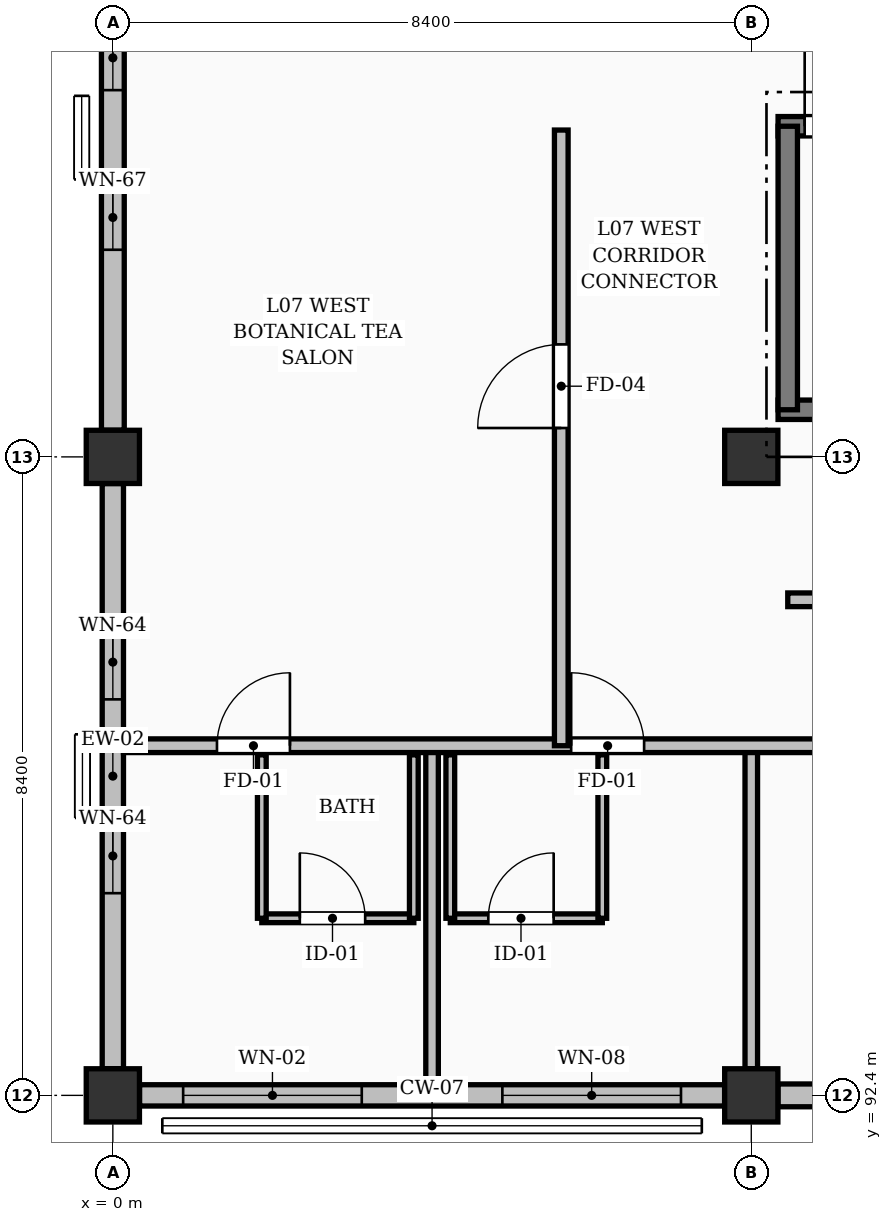
"""IFC4 building model, lengths in metres.
Left out: names, types, materials, properties, quantities, classifications, styles, units other than length and angle.
Written with IfcOpenShell. Run it as: python <this file> out.ifc"""

import sys

from ifc_helpers import new_model, si_unit, direction, frame, frame_2d, origin, origin_2d, place, context, subcontext, project, spatial, rectangle, extrude, element, fill, save


model = new_model("IFC4")
c1 = context("Model", 3, precision=1e-05, world=origin(), true_north=direction((0.0, 1.0)))
c2 = subcontext(c1, "Body", "Model", "MODEL_VIEW")
j1 = project(units=[si_unit("LENGTHUNIT", "METRE"), si_unit("PLANEANGLEUNIT", "RADIAN")], contexts=[c1])
p1 = place(None, origin())
s1 = spatial("IfcSite", under=j1, at=p1, CompositionType="ELEMENT")
p2 = place(p1, origin())
s2 = spatial("IfcBuilding", under=s1, at=p2, CompositionType="ELEMENT")
p3 = place(p2, frame((0.0, 0.0, 25.2)))
s3 = spatial("IfcBuildingStorey", under=s2, at=p3, CompositionType="ELEMENT", Elevation=25.2)
for number, where, z_axis, x_axis in (
    (1, (0.0, 92.4, 0.0), (0.0, 0.0, 1.0), (1.0, 0.0, 0.0)),
    (2, (0.0, 100.8, 0.0), (0.0, 0.0, 1.0), (1.0, 0.0, 0.0)),
    (3, (8.4, 92.4, 0.0), (0.0, 0.0, 1.0), (1.0, 0.0, 0.0)),
    (4, (8.4, 100.8, 0.0), (0.0, 0.0, 1.0), (1.0, 0.0, 0.0)),
):
    element("IfcColumn", number, at=place(p3, frame(where, z_axis=z_axis, x_axis=x_axis)), inside=s3, PredefinedType="COLUMN", context=c2, shape_type="SweptSolid", body=[
        extrude(rectangle(XDim=0.7, YDim=0.7, at=origin_2d()), origin(), (0.0, 0.0, 1.0), 3.36),
    ])
p4 = place(p3, frame((0.351, 92.4, 0.0), z_axis=(0.0, 0.0, 1.0), x_axis=(1.0, 0.0, 0.0)))
e5 = element("IfcWall", 5, at=p4, inside=s3, PredefinedType="SOLIDWALL", context=c2, shape_type="SweptSolid", body=[
    extrude(rectangle(XDim=7.698, YDim=0.28, at=frame_2d((3.849, 0.0))), origin(), (0.0, 0.0, 1.0), 2.414),
])
p5 = place(p4, frame((0.574, 0.0, 0.25)))
e6 = element("IfcOpeningElement", 6, at=p5, cuts=e5, PredefinedType="OPENING", context=c2, shape_type="SweptSolid", body=[
    extrude(rectangle(XDim=2.35, YDim=1.85, at=frame_2d((1.175, 0.925))), frame((0.0, 0.15, 0.0), z_axis=(0.0, -1.0, 0.0), x_axis=(1.0, 0.0, 0.0)), (0.0, 0.0, 1.0), 0.3),
])
p6 = place(p4, frame((4.774, 0.0, 0.25)))
e7 = element("IfcOpeningElement", 7, at=p6, cuts=e5, PredefinedType="OPENING", context=c2, shape_type="SweptSolid", body=[
    extrude(rectangle(XDim=2.35, YDim=1.95, at=frame_2d((1.175, 0.975))), frame((0.0, 0.15, 0.0), z_axis=(0.0, -1.0, 0.0), x_axis=(1.0, 0.0, 0.0)), (0.0, 0.0, 1.0), 0.3),
])
p7 = place(p3, frame((8.751, 92.4, 0.0), z_axis=(0.0, 0.0, 1.0), x_axis=(1.0, 0.0, 0.0)))
e8 = element("IfcWall", 8, at=p7, inside=s3, PredefinedType="SOLIDWALL", context=c2, shape_type="SweptSolid", body=[
    extrude(rectangle(XDim=7.698, YDim=0.3, at=frame_2d((3.849, 0.0))), origin(), (0.0, 0.0, 1.0), 2.494),
])
p8 = place(p7, frame((1.024, 0.0, 0.0)))
e9 = element("IfcOpeningElement", 9, at=p8, cuts=e8, PredefinedType="OPENING", context=c2, shape_type="SweptSolid", body=[
    extrude(rectangle(XDim=1.55, YDim=2.08, at=frame_2d((0.775, 1.04))), frame((0.0, 0.16, 0.0), z_axis=(0.0, -1.0, 0.0), x_axis=(1.0, 0.0, 0.0)), (0.0, 0.0, 1.0), 0.32),
])
p9 = place(p7, frame((4.674, 0.0, 0.25)))
e10 = element("IfcOpeningElement", 10, at=p9, cuts=e8, PredefinedType="OPENING", context=c2, shape_type="SweptSolid", body=[
    extrude(rectangle(XDim=2.25, YDim=1.85, at=frame_2d((1.125, 0.925))), frame((0.0, 0.16, 0.0), z_axis=(0.0, -1.0, 0.0), x_axis=(1.0, 0.0, 0.0)), (0.0, 0.0, 1.0), 0.32),
])
p10 = place(p3, frame((0.0, 92.751, 0.0), z_axis=(0.0, 0.0, 1.0), x_axis=(0.0, 1.0, 0.0)))
e11 = element("IfcWall", 11, at=p10, inside=s3, PredefinedType="SOLIDWALL", context=c2, shape_type="SweptSolid", body=[
    extrude(rectangle(XDim=7.698, YDim=0.28, at=frame_2d((3.849, 0.0))), origin(), (0.0, 0.0, 1.0), 2.414),
])
p11 = place(p10, frame((2.309, 0.0, 0.3)))
e12 = element("IfcOpeningElement", 12, at=p11, cuts=e11, PredefinedType="OPENING", context=c2, shape_type="SweptSolid", body=[
    extrude(rectangle(XDim=0.98, YDim=1.75, at=frame_2d((0.49, 0.875))), frame((0.0, 0.15, 0.0), z_axis=(0.0, -1.0, 0.0), x_axis=(1.0, 0.0, 0.0)), (0.0, 0.0, 1.0), 0.3),
])
p12 = place(p10, frame((4.859, 0.0, 0.3)))
e13 = element("IfcOpeningElement", 13, at=p12, cuts=e11, PredefinedType="OPENING", context=c2, shape_type="SweptSolid", body=[
    extrude(rectangle(XDim=0.98, YDim=1.75, at=frame_2d((0.49, 0.875))), frame((0.0, 0.15, 0.0), z_axis=(0.0, -1.0, 0.0), x_axis=(1.0, 0.0, 0.0)), (0.0, 0.0, 1.0), 0.3),
])
p13 = place(p3, frame((0.0, 101.151, 0.0), z_axis=(0.0, 0.0, 1.0), x_axis=(0.0, 1.0, 0.0)))
e14 = element("IfcWall", 14, at=p13, inside=s3, PredefinedType="SOLIDWALL", context=c2, shape_type="SweptSolid", body=[
    extrude(rectangle(XDim=7.698, YDim=0.3, at=frame_2d((3.849, 0.0))), origin(), (0.0, 0.0, 1.0), 2.414),
])
p14 = place(p13, frame((2.374, 0.0, 0.3)))
e15 = element("IfcOpeningElement", 15, at=p14, cuts=e14, PredefinedType="OPENING", context=c2, shape_type="SweptSolid", body=[
    extrude(rectangle(XDim=0.85, YDim=1.9, at=frame_2d((0.425, 0.95))), frame((0.0, 0.16, 0.0), z_axis=(0.0, -1.0, 0.0), x_axis=(1.0, 0.0, 0.0)), (0.0, 0.0, 1.0), 0.32),
])
p15 = place(p13, frame((4.474, 0.0, 0.3)))
e16 = element("IfcOpeningElement", 16, at=p15, cuts=e14, PredefinedType="OPENING", context=c2, shape_type="SweptSolid", body=[
    extrude(rectangle(XDim=0.85, YDim=1.9, at=frame_2d((0.425, 0.95))), frame((0.0, 0.16, 0.0), z_axis=(0.0, -1.0, 0.0), x_axis=(1.0, 0.0, 0.0)), (0.0, 0.0, 1.0), 0.32),
])
p16 = place(p3, frame((8.752, 101.42, 0.0), z_axis=(0.0, 0.0, 1.0), x_axis=(1.0, 0.0, 0.0)))
e17 = element("IfcWall", 17, at=p16, inside=s3, PredefinedType="SOLIDWALL", context=c2, shape_type="SweptSolid", body=[
    extrude(rectangle(XDim=8.225, YDim=0.255, at=frame_2d((4.113, 0.0))), origin(), (0.0, 0.0, 1.0), 3.12),
])
p17 = place(p3, frame((8.752, 105.15, 0.0), z_axis=(0.0, 0.0, 1.0), x_axis=(1.0, 0.0, 0.0)))
e18 = element("IfcWall", 18, at=p17, inside=s3, PredefinedType="SOLIDWALL", context=c2, shape_type="SweptSolid", body=[
    extrude(rectangle(XDim=8.225, YDim=0.255, at=frame_2d((4.113, 0.0))), origin(), (0.0, 0.0, 1.0), 3.12),
])
p18 = place(p17, frame((0.35, 0.0, 0.0)))
e19 = element("IfcOpeningElement", 19, at=p18, cuts=e18, PredefinedType="OPENING", context=c2, shape_type="SweptSolid", body=[
    extrude(rectangle(XDim=1.16, YDim=2.15, at=frame_2d((0.58, 1.075))), frame((0.0, 0.137, 0.0), z_axis=(0.0, -1.0, 0.0), x_axis=(1.0, 0.0, 0.0)), (0.0, 0.0, 1.0), 0.275),
])
p19 = place(p3, frame((8.88, 101.42, 0.0), z_axis=(0.0, 0.0, 1.0), x_axis=(0.0, 1.0, 0.0)))
e20 = element("IfcWall", 20, at=p19, inside=s3, PredefinedType="SOLIDWALL", context=c2, shape_type="SweptSolid", body=[
    extrude(rectangle(XDim=3.73, YDim=0.255, at=frame_2d((1.865, 0.0))), origin(), (0.0, 0.0, 1.0), 3.12),
])
p20 = place(p3, frame((1.96, 94.73, 0.0), z_axis=(0.0, 0.0, 1.0), x_axis=(1.0, 0.0, 0.0)))
e21 = element("IfcWall", 21, at=p20, inside=s3, PredefinedType="PARTITIONING", context=c2, shape_type="SweptSolid", body=[
    extrude(rectangle(XDim=2.0, YDim=0.115, at=frame_2d((1.0, 0.0))), origin(), (0.0, 0.0, 1.0), 3.12),
])
p21 = place(p20, frame((0.5, 0.0, 0.0)))
e22 = element("IfcOpeningElement", 22, at=p21, cuts=e21, PredefinedType="OPENING", context=c2, shape_type="SweptSolid", body=[
    extrude(rectangle(XDim=0.86, YDim=2.05, at=frame_2d((0.43, 1.025))), frame((0.0, 0.067, 0.0), z_axis=(0.0, -1.0, 0.0), x_axis=(1.0, 0.0, 0.0)), (0.0, 0.0, 1.0), 0.135),
])
for number, where, z_axis, x_axis in (
    (23, (1.96, 94.73, 0.0), (0.0, 0.0, 1.0), (0.0, 1.0, 0.0)),
    (24, (3.96, 94.73, 0.0), (0.0, 0.0, 1.0), (0.0, 1.0, 0.0)),
):
    element("IfcWall", number, at=place(p3, frame(where, z_axis=z_axis, x_axis=x_axis)), inside=s3, PredefinedType="PARTITIONING", context=c2, shape_type="SweptSolid", body=[
        extrude(rectangle(XDim=2.15, YDim=0.115, at=frame_2d((1.075, 0.0))), origin(), (0.0, 0.0, 1.0), 3.12),
    ])
p22 = place(p3, frame((4.44, 94.73, 0.0), z_axis=(0.0, 0.0, 1.0), x_axis=(1.0, 0.0, 0.0)))
e25 = element("IfcWall", 25, at=p22, inside=s3, PredefinedType="PARTITIONING", context=c2, shape_type="SweptSolid", body=[
    extrude(rectangle(XDim=2.0, YDim=0.115, at=frame_2d((1.0, 0.0))), origin(), (0.0, 0.0, 1.0), 3.12),
])
p23 = place(p22, frame((0.5, 0.0, 0.0)))
e26 = element("IfcOpeningElement", 26, at=p23, cuts=e25, PredefinedType="OPENING", context=c2, shape_type="SweptSolid", body=[
    extrude(rectangle(XDim=0.86, YDim=2.05, at=frame_2d((0.43, 1.025))), frame((0.0, 0.067, 0.0), z_axis=(0.0, -1.0, 0.0), x_axis=(1.0, 0.0, 0.0)), (0.0, 0.0, 1.0), 0.135),
])
for number, where, z_axis, x_axis in (
    (27, (4.44, 94.73, 0.0), (0.0, 0.0, 1.0), (0.0, 1.0, 0.0)),
    (28, (6.44, 94.73, 0.0), (0.0, 0.0, 1.0), (0.0, 1.0, 0.0)),
):
    element("IfcWall", number, at=place(p3, frame(where, z_axis=z_axis, x_axis=x_axis)), inside=s3, PredefinedType="PARTITIONING", context=c2, shape_type="SweptSolid", body=[
        extrude(rectangle(XDim=2.15, YDim=0.115, at=frame_2d((1.075, 0.0))), origin(), (0.0, 0.0, 1.0), 3.12),
    ])
p24 = place(p3, frame((4.2, 92.54, 0.0), z_axis=(0.0, 0.0, 1.0), x_axis=(0.0, 1.0, 0.0)))
e29 = element("IfcWall", 29, at=p24, inside=s3, PredefinedType="PARTITIONING", context=c2, shape_type="SweptSolid", body=[
    extrude(rectangle(XDim=4.46, YDim=0.165, at=frame_2d((2.23, 0.0))), origin(), (0.0, 0.0, 1.0), 3.12),
])
p25 = place(p3, frame((8.4, 92.75, 0.0), z_axis=(0.0, 0.0, 1.0), x_axis=(0.0, 1.0, 0.0)))
e30 = element("IfcWall", 30, at=p25, inside=s3, PredefinedType="PARTITIONING", context=c2, shape_type="SweptSolid", body=[
    extrude(rectangle(XDim=4.25, YDim=0.165, at=frame_2d((2.125, 0.0))), origin(), (0.0, 0.0, 1.0), 2.375),
])
p26 = place(p3, frame((0.14, 97.0, 0.0), z_axis=(0.0, 0.0, 1.0), x_axis=(1.0, 0.0, 0.0)))
e31 = element("IfcWall", 31, at=p26, inside=s3, PredefinedType="PARTITIONING", context=c2, shape_type="SweptSolid", body=[
    extrude(rectangle(XDim=50.26, YDim=0.18, at=frame_2d((25.13, 0.0))), origin(), (0.0, 0.0, 1.0), 3.12),
])
p27 = place(p26, frame((1.23, 0.0, 0.0)))
e32 = element("IfcOpeningElement", 32, at=p27, cuts=e31, PredefinedType="OPENING", context=c2, shape_type="SweptSolid", body=[
    extrude(rectangle(XDim=0.96, YDim=2.15, at=frame_2d((0.48, 1.075))), frame((0.0, 0.1, 0.0), z_axis=(0.0, -1.0, 0.0), x_axis=(1.0, 0.0, 0.0)), (0.0, 0.0, 1.0), 0.2),
])
p28 = place(p26, frame((5.89, 0.0, 0.0)))
e33 = element("IfcOpeningElement", 33, at=p28, cuts=e31, PredefinedType="OPENING", context=c2, shape_type="SweptSolid", body=[
    extrude(rectangle(XDim=0.96, YDim=2.15, at=frame_2d((0.48, 1.075))), frame((0.0, 0.1, 0.0), z_axis=(0.0, -1.0, 0.0), x_axis=(1.0, 0.0, 0.0)), (0.0, 0.0, 1.0), 0.2),
])
p29 = place(p26, frame((11.66, 0.0, 0.0)))
e34 = element("IfcOpeningElement", 34, at=p29, cuts=e31, PredefinedType="OPENING", context=c2, shape_type="SweptSolid", body=[
    extrude(rectangle(XDim=1.62, YDim=2.2, at=frame_2d((0.81, 1.1))), frame((0.0, 0.1, 0.0), z_axis=(0.0, -1.0, 0.0), x_axis=(1.0, 0.0, 0.0)), (0.0, 0.0, 1.0), 0.2),
])
p30 = place(p26, frame((18.03, 0.0, 0.0)))
e35 = element("IfcOpeningElement", 35, at=p30, cuts=e31, PredefinedType="OPENING", context=c2, shape_type="SweptSolid", body=[
    extrude(rectangle(XDim=0.96, YDim=2.15, at=frame_2d((0.48, 1.075))), frame((0.0, 0.1, 0.0), z_axis=(0.0, -1.0, 0.0), x_axis=(1.0, 0.0, 0.0)), (0.0, 0.0, 1.0), 0.2),
])
p31 = place(p26, frame((22.69, 0.0, 0.0)))
e36 = element("IfcOpeningElement", 36, at=p31, cuts=e31, PredefinedType="OPENING", context=c2, shape_type="SweptSolid", body=[
    extrude(rectangle(XDim=0.96, YDim=2.15, at=frame_2d((0.48, 1.075))), frame((0.0, 0.1, 0.0), z_axis=(0.0, -1.0, 0.0), x_axis=(1.0, 0.0, 0.0)), (0.0, 0.0, 1.0), 0.2),
])
p32 = place(p26, frame((26.43, 0.0, 0.0)))
e37 = element("IfcOpeningElement", 37, at=p32, cuts=e31, PredefinedType="OPENING", context=c2, shape_type="SweptSolid", body=[
    extrude(rectangle(XDim=0.96, YDim=2.15, at=frame_2d((0.48, 1.075))), frame((0.0, 0.1, 0.0), z_axis=(0.0, -1.0, 0.0), x_axis=(1.0, 0.0, 0.0)), (0.0, 0.0, 1.0), 0.2),
])
p33 = place(p26, frame((31.09, 0.0, 0.0)))
e38 = element("IfcOpeningElement", 38, at=p33, cuts=e31, PredefinedType="OPENING", context=c2, shape_type="SweptSolid", body=[
    extrude(rectangle(XDim=0.96, YDim=2.15, at=frame_2d((0.48, 1.075))), frame((0.0, 0.1, 0.0), z_axis=(0.0, -1.0, 0.0), x_axis=(1.0, 0.0, 0.0)), (0.0, 0.0, 1.0), 0.2),
])
p34 = place(p26, frame((34.83, 0.0, 0.0)))
e39 = element("IfcOpeningElement", 39, at=p34, cuts=e31, PredefinedType="OPENING", context=c2, shape_type="SweptSolid", body=[
    extrude(rectangle(XDim=0.96, YDim=2.15, at=frame_2d((0.48, 1.075))), frame((0.0, 0.1, 0.0), z_axis=(0.0, -1.0, 0.0), x_axis=(1.0, 0.0, 0.0)), (0.0, 0.0, 1.0), 0.2),
])
p35 = place(p26, frame((39.49, 0.0, 0.0)))
e40 = element("IfcOpeningElement", 40, at=p35, cuts=e31, PredefinedType="OPENING", context=c2, shape_type="SweptSolid", body=[
    extrude(rectangle(XDim=0.96, YDim=2.15, at=frame_2d((0.48, 1.075))), frame((0.0, 0.1, 0.0), z_axis=(0.0, -1.0, 0.0), x_axis=(1.0, 0.0, 0.0)), (0.0, 0.0, 1.0), 0.2),
])
p36 = place(p26, frame((43.23, 0.0, 0.0)))
e41 = element("IfcOpeningElement", 41, at=p36, cuts=e31, PredefinedType="OPENING", context=c2, shape_type="SweptSolid", body=[
    extrude(rectangle(XDim=0.96, YDim=2.15, at=frame_2d((0.48, 1.075))), frame((0.0, 0.1, 0.0), z_axis=(0.0, -1.0, 0.0), x_axis=(1.0, 0.0, 0.0)), (0.0, 0.0, 1.0), 0.2),
])
p37 = place(p26, frame((47.89, 0.0, 0.0)))
e42 = element("IfcOpeningElement", 42, at=p37, cuts=e31, PredefinedType="OPENING", context=c2, shape_type="SweptSolid", body=[
    extrude(rectangle(XDim=0.96, YDim=2.15, at=frame_2d((0.48, 1.075))), frame((0.0, 0.1, 0.0), z_axis=(0.0, -1.0, 0.0), x_axis=(1.0, 0.0, 0.0)), (0.0, 0.0, 1.0), 0.2),
])
p38 = place(p3, frame((8.88, 98.92, 0.0), z_axis=(0.0, 0.0, 1.0), x_axis=(1.0, 0.0, 0.0)))
e43 = element("IfcWall", 43, at=p38, inside=s3, PredefinedType="PARTITIONING", context=c2, shape_type="SweptSolid", body=[
    extrude(rectangle(XDim=16.37, YDim=0.18, at=frame_2d((8.185, 0.0))), origin(), (0.0, 0.0, 1.0), 3.12),
])
p39 = place(p38, frame((4.42, 0.0, 0.0)))
e44 = element("IfcOpeningElement", 44, at=p39, cuts=e43, PredefinedType="OPENING", context=c2, shape_type="SweptSolid", body=[
    extrude(rectangle(XDim=1.5, YDim=2.2, at=frame_2d((0.75, 1.1))), frame((0.0, 0.1, 0.0), z_axis=(0.0, -1.0, 0.0), x_axis=(1.0, 0.0, 0.0)), (0.0, 0.0, 1.0), 0.2),
])
p40 = place(p3, frame((5.9, 97.0, 0.0), z_axis=(0.0, 0.0, 1.0), x_axis=(0.0, 1.0, 0.0)))
e45 = element("IfcWall", 45, at=p40, inside=s3, PredefinedType="PARTITIONING", context=c2, shape_type="SweptSolid", body=[
    extrude(rectangle(XDim=8.1, YDim=0.18, at=frame_2d((4.05, 0.0))), origin(), (0.0, 0.0, 1.0), 3.12),
])
p41 = place(p40, frame((4.18, 0.0, 0.0)))
e46 = element("IfcOpeningElement", 46, at=p41, cuts=e45, PredefinedType="OPENING", context=c2, shape_type="SweptSolid", body=[
    extrude(rectangle(XDim=1.1, YDim=2.1, at=frame_2d((0.55, 1.05))), frame((0.0, 0.1, 0.0), z_axis=(0.0, -1.0, 0.0), x_axis=(1.0, 0.0, 0.0)), (0.0, 0.0, 1.0), 0.2),
])
p42 = place(p5, origin())
e47 = element("IfcWindow", 47, at=p42, inside=s3, PartitioningType="DOUBLE_PANEL_VERTICAL", PredefinedType="WINDOW", context=c2, shape_type="SweptSolid", body=[
    extrude(rectangle(XDim=2.35, YDim=1.85, at=frame_2d((1.175, 0.925))), frame((0.0, 0.03, 0.0), z_axis=(0.0, -1.0, 0.0), x_axis=(1.0, 0.0, 0.0)), (0.0, 0.0, 1.0), 0.06),
])
fill(e6, e47)
p43 = place(p6, origin())
e48 = element("IfcWindow", 48, at=p43, inside=s3, PartitioningType="DOUBLE_PANEL_VERTICAL", PredefinedType="WINDOW", context=c2, shape_type="SweptSolid", body=[
    extrude(rectangle(XDim=2.35, YDim=1.95, at=frame_2d((1.175, 0.975))), frame((0.0, 0.03, 0.0), z_axis=(0.0, -1.0, 0.0), x_axis=(1.0, 0.0, 0.0)), (0.0, 0.0, 1.0), 0.06),
])
fill(e7, e48)
p44 = place(p11, origin())
e49 = element("IfcWindow", 49, at=p44, inside=s3, PartitioningType="SINGLE_PANEL", PredefinedType="WINDOW", context=c2, shape_type="SweptSolid", body=[
    extrude(rectangle(XDim=0.98, YDim=1.75, at=frame_2d((0.49, 0.875))), frame((0.0, 0.03, 0.0), z_axis=(0.0, -1.0, 0.0), x_axis=(1.0, 0.0, 0.0)), (0.0, 0.0, 1.0), 0.06),
])
fill(e12, e49)
p45 = place(p12, origin())
e50 = element("IfcWindow", 50, at=p45, inside=s3, PartitioningType="SINGLE_PANEL", PredefinedType="WINDOW", context=c2, shape_type="SweptSolid", body=[
    extrude(rectangle(XDim=0.98, YDim=1.75, at=frame_2d((0.49, 0.875))), frame((0.0, 0.03, 0.0), z_axis=(0.0, -1.0, 0.0), x_axis=(1.0, 0.0, 0.0)), (0.0, 0.0, 1.0), 0.06),
])
fill(e13, e50)
p46 = place(p14, origin())
e51 = element("IfcWindow", 51, at=p46, inside=s3, PartitioningType="SINGLE_PANEL", PredefinedType="WINDOW", context=c2, shape_type="SweptSolid", body=[
    extrude(rectangle(XDim=0.85, YDim=1.9, at=frame_2d((0.425, 0.95))), frame((0.0, 0.03, 0.0), z_axis=(0.0, -1.0, 0.0), x_axis=(1.0, 0.0, 0.0)), (0.0, 0.0, 1.0), 0.06),
])
fill(e15, e51)
p47 = place(p15, origin())
e52 = element("IfcWindow", 52, at=p47, inside=s3, PartitioningType="SINGLE_PANEL", PredefinedType="WINDOW", context=c2, shape_type="SweptSolid", body=[
    extrude(rectangle(XDim=0.85, YDim=1.9, at=frame_2d((0.425, 0.95))), frame((0.0, 0.03, 0.0), z_axis=(0.0, -1.0, 0.0), x_axis=(1.0, 0.0, 0.0)), (0.0, 0.0, 1.0), 0.06),
])
fill(e16, e52)
p48 = place(p18, origin())
e53 = element("IfcDoor", 53, at=p48, inside=s3, OperationType="SINGLE_SWING_LEFT", PredefinedType="DOOR", context=c2, shape_type="SweptSolid", body=[
    extrude(rectangle(XDim=1.16, YDim=2.15, at=frame_2d((0.58, 1.075))), frame((0.0, 0.025, 0.0), z_axis=(0.0, -1.0, 0.0), x_axis=(1.0, 0.0, 0.0)), (0.0, 0.0, 1.0), 0.05),
])
fill(e19, e53)
p49 = place(p21, origin())
e54 = element("IfcDoor", 54, at=p49, inside=s3, OperationType="SINGLE_SWING_LEFT", PredefinedType="DOOR", context=c2, shape_type="SweptSolid", body=[
    extrude(rectangle(XDim=0.86, YDim=2.05, at=frame_2d((0.43, 1.025))), frame((0.0, 0.025, 0.0), z_axis=(0.0, -1.0, 0.0), x_axis=(1.0, 0.0, 0.0)), (0.0, 0.0, 1.0), 0.05),
])
fill(e22, e54)
p50 = place(p23, origin())
e55 = element("IfcDoor", 55, at=p50, inside=s3, OperationType="SINGLE_SWING_RIGHT", PredefinedType="DOOR", context=c2, shape_type="SweptSolid", body=[
    extrude(rectangle(XDim=0.86, YDim=2.05, at=frame_2d((0.43, 1.025))), frame((0.0, 0.025, 0.0), z_axis=(0.0, -1.0, 0.0), x_axis=(1.0, 0.0, 0.0)), (0.0, 0.0, 1.0), 0.05),
])
fill(e26, e55)
p51 = place(p27, origin())
e56 = element("IfcDoor", 56, at=p51, inside=s3, OperationType="SINGLE_SWING_RIGHT", PredefinedType="DOOR", context=c2, shape_type="SweptSolid", body=[
    extrude(rectangle(XDim=0.96, YDim=2.15, at=frame_2d((0.48, 1.075))), frame((0.0, 0.025, 0.0), z_axis=(0.0, -1.0, 0.0), x_axis=(1.0, 0.0, 0.0)), (0.0, 0.0, 1.0), 0.05),
])
fill(e32, e56)
p52 = place(p28, origin())
e57 = element("IfcDoor", 57, at=p52, inside=s3, OperationType="SINGLE_SWING_LEFT", PredefinedType="DOOR", context=c2, shape_type="SweptSolid", body=[
    extrude(rectangle(XDim=0.96, YDim=2.15, at=frame_2d((0.48, 1.075))), frame((0.0, 0.025, 0.0), z_axis=(0.0, -1.0, 0.0), x_axis=(1.0, 0.0, 0.0)), (0.0, 0.0, 1.0), 0.05),
])
fill(e33, e57)
p53 = place(p41, origin())
e58 = element("IfcDoor", 58, at=p53, inside=s3, OperationType="SINGLE_SWING_LEFT", PredefinedType="DOOR", context=c2, shape_type="SweptSolid", body=[
    extrude(rectangle(XDim=1.1, YDim=2.1, at=frame_2d((0.55, 1.05))), frame((0.0, 0.025, 0.0), z_axis=(0.0, -1.0, 0.0), x_axis=(1.0, 0.0, 0.0)), (0.0, 0.0, 1.0), 0.05),
])
fill(e46, e58)
save(model, sys.argv[1])
